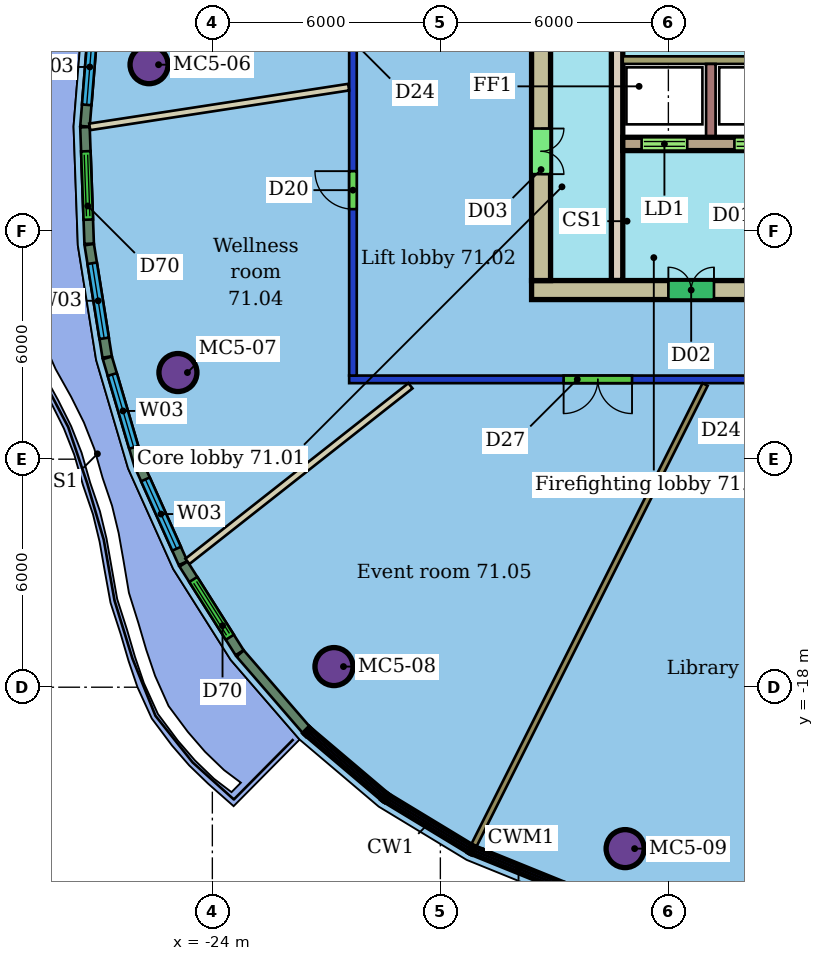
"""IFC4 building model, lengths in metres.
Left out: names, types, materials, properties, quantities, classifications, styles, units other than length and angle.
Written with IfcOpenShell. Run it as: python <this file> out.ifc"""

import sys

from ifc_helpers import new_model, si_unit, direction, frame, frame_2d, origin, origin_2d, place, context, subcontext, project, spatial, rectangle, hollow_circle, extrude, element, fill, save


model = new_model("IFC4")
c1 = context("Model", 3, precision=1e-05, world=origin(), true_north=direction((0.0, 1.0)))
c2 = subcontext(c1, "Body", "Model", "MODEL_VIEW")
j1 = project(units=[si_unit("LENGTHUNIT", "METRE"), si_unit("PLANEANGLEUNIT", "RADIAN")], contexts=[c1])
p1 = place(None, origin())
s1 = spatial("IfcSite", under=j1, at=p1, CompositionType="ELEMENT")
p2 = place(p1, origin())
s2 = spatial("IfcBuilding", under=s1, at=p2, CompositionType="ELEMENT")
p3 = place(p2, frame((0.0, 0.0, 286.5)))
s3 = spatial("IfcBuildingStorey", under=s2, at=p3, CompositionType="ELEMENT", Elevation=286.5)
for number, where, z_axis, x_axis in (
    (1, (-25.666, -1.62, 0.0), (0.0, 0.0, 1.0), (1.0, 0.0, 0.0)),
    (2, (-24.906, -9.72, 0.0), (0.0, 0.0, 1.0), (1.0, 0.0, 0.0)),
    (3, (-20.8, -17.457, 0.0), (0.0, 0.0, 1.0), (1.0, 0.0, 0.0)),
    (4, (-13.138, -22.247, 0.0), (0.0, 0.0, 1.0), (1.0, 0.0, 0.0)),
):
    element("IfcColumn", number, at=place(p3, frame(where, z_axis=z_axis, x_axis=x_axis)), inside=s3, PredefinedType="COLUMN", context=c2, shape_type="SweptSolid", body=[
        extrude(hollow_circle(Radius=0.5, WallThickness=0.04, at=origin_2d()), origin(), (0.0, 0.0, 1.0), 3.45),
    ])
p4 = place(p3, frame((8.4, -9.9, 0.0), z_axis=(0.0, 0.0, 1.0), x_axis=(-1.0, 0.0, 0.0)))
e5 = element("IfcWall", 5, at=p4, inside=s3, PredefinedType="PARTITIONING", context=c2, shape_type="SweptSolid", body=[
    extrude(rectangle(XDim=28.8, YDim=0.2, at=frame_2d((14.4, 0.0))), origin(), (0.0, 0.0, 1.0), 3.1),
])
p5 = place(p4, frame((21.356, 0.0, 0.0)))
e6 = element("IfcOpeningElement", 6, at=p5, cuts=e5, PredefinedType="OPENING", context=c2, shape_type="SweptSolid", body=[
    extrude(rectangle(XDim=1.8, YDim=2.4, at=frame_2d((0.9, 1.2))), frame((0.0, 0.11, 0.0), z_axis=(0.0, -1.0, 0.0), x_axis=(1.0, 0.0, 0.0)), (0.0, 0.0, 1.0), 0.22),
])
p6 = place(p4, frame((16.027, 0.0, 0.0)))
e7 = element("IfcOpeningElement", 7, at=p6, cuts=e5, PredefinedType="OPENING", context=c2, shape_type="SweptSolid", body=[
    extrude(rectangle(XDim=1.5, YDim=2.1, at=frame_2d((0.75, 1.05))), frame((0.0, 0.11, 0.0), z_axis=(0.0, -1.0, 0.0), x_axis=(1.0, 0.0, 0.0)), (0.0, 0.0, 1.0), 0.22),
])
p7 = place(p4, frame((8.479, 0.0, 0.0)))
e8 = element("IfcOpeningElement", 8, at=p7, cuts=e5, PredefinedType="OPENING", context=c2, shape_type="SweptSolid", body=[
    extrude(rectangle(XDim=0.9, YDim=2.1, at=frame_2d((0.45, 1.05))), frame((0.0, 0.11, 0.0), z_axis=(0.0, -1.0, 0.0), x_axis=(1.0, 0.0, 0.0)), (0.0, 0.0, 1.0), 0.22),
])
p8 = place(p3, frame((-20.3, -9.8, 0.0), z_axis=(0.0, 0.0, 1.0), x_axis=(0.0, 1.0, 0.0)))
e9 = element("IfcWall", 9, at=p8, inside=s3, PredefinedType="PARTITIONING", context=c2, shape_type="SweptSolid", body=[
    extrude(rectangle(XDim=19.6, YDim=0.2, at=frame_2d((9.8, 0.0))), origin(), (0.0, 0.0, 1.0), 3.1),
])
p9 = place(p8, frame((8.643, 0.0, 0.0)))
e10 = element("IfcOpeningElement", 10, at=p9, cuts=e9, PredefinedType="OPENING", context=c2, shape_type="SweptSolid", body=[
    extrude(rectangle(XDim=1.5, YDim=2.1, at=frame_2d((0.75, 1.05))), frame((0.0, 0.11, 0.0), z_axis=(0.0, -1.0, 0.0), x_axis=(1.0, 0.0, 0.0)), (0.0, 0.0, 1.0), 0.22),
])
p10 = place(p8, frame((4.379, 0.0, 0.0)))
e11 = element("IfcOpeningElement", 11, at=p10, cuts=e9, PredefinedType="OPENING", context=c2, shape_type="SweptSolid", body=[
    extrude(rectangle(XDim=1.0, YDim=2.1, at=frame_2d((0.5, 1.05))), frame((0.0, 0.11, 0.0), z_axis=(0.0, -1.0, 0.0), x_axis=(1.0, 0.0, 0.0)), (0.0, 0.0, 1.0), 0.22),
])
p11 = place(p3, frame((-27.228, -3.256, 0.0), z_axis=(0.0, 0.0, 1.0), x_axis=(0.988435478187, 0.151642030654, 0.0)))
e12 = element("IfcWall", 12, at=p11, inside=s3, PredefinedType="PARTITIONING", context=c2, shape_type="SweptSolid", body=[
    extrude(rectangle(XDim=6.894, YDim=0.175, at=frame_2d((3.447, 0.0))), origin(), (0.0, 0.0, 1.0), 3.45),
])
p12 = place(p3, frame((-24.656, -14.689, 0.0), z_axis=(0.0, 0.0, 1.0), x_axis=(0.785692916709, 0.618616715449, 0.0)))
e13 = element("IfcWall", 13, at=p12, inside=s3, PredefinedType="PARTITIONING", context=c2, shape_type="SweptSolid", body=[
    extrude(rectangle(XDim=7.469, YDim=0.175, at=frame_2d((3.734, 0.0))), origin(), (0.0, 0.0, 1.0), 3.45),
])
p13 = place(p3, frame((-17.118, -22.163, 0.0), z_axis=(0.0, 0.0, 1.0), x_axis=(0.448386215015, 0.893839919776, 0.0)))
e14 = element("IfcWall", 14, at=p13, inside=s3, PredefinedType="PARTITIONING", context=c2, shape_type="SweptSolid", body=[
    extrude(rectangle(XDim=13.57, YDim=0.15, at=frame_2d((6.785, 0.0))), origin(), (0.0, 0.0, 1.0), 3.45),
])
p14 = place(p3, frame((-27.098, -0.118, 0.0), z_axis=(0.0, 0.0, 1.0), x_axis=(-0.080847238515, -0.996726504125, 0.0)))
e15 = element("IfcWall", 15, at=p14, inside=s3, PredefinedType="SOLIDWALL", context=c2, shape_type="SweptSolid", body=[
    extrude(rectangle(XDim=3.135, YDim=0.25, at=frame_2d((1.567, 0.0))), origin(), (0.0, 0.0, 1.0), 3.15),
])
p15 = place(p14, frame((0.567, 0.0, 0.9)))
e16 = element("IfcOpeningElement", 16, at=p15, cuts=e15, PredefinedType="OPENING", context=c2, shape_type="SweptSolid", body=[
    extrude(rectangle(XDim=2.0, YDim=2.1, at=frame_2d((1.0, 1.05))), frame((0.0, 0.135, 0.0), z_axis=(0.0, -1.0, 0.0), x_axis=(1.0, 0.0, 0.0)), (0.0, 0.0, 1.0), 0.27),
])
p16 = place(p3, frame((-27.352, -3.265, 0.0), z_axis=(0.0, 0.0, 1.0), x_axis=(0.035961121069, -0.999353189704, 0.0)))
e17 = element("IfcWall", 17, at=p16, inside=s3, PredefinedType="SOLIDWALL", context=c2, shape_type="SweptSolid", body=[
    extrude(rectangle(XDim=3.069, YDim=0.25, at=frame_2d((1.534, 0.0))), origin(), (0.0, 0.0, 1.0), 3.15),
])
p17 = place(p16, frame((0.634, 0.0, 0.0)))
e18 = element("IfcOpeningElement", 18, at=p17, cuts=e17, PredefinedType="OPENING", context=c2, shape_type="SweptSolid", body=[
    extrude(rectangle(XDim=1.8, YDim=2.4, at=frame_2d((0.9, 1.2))), frame((0.0, 0.135, 0.0), z_axis=(0.0, -1.0, 0.0), x_axis=(1.0, 0.0, 0.0)), (0.0, 0.0, 1.0), 0.27),
])
p18 = place(p3, frame((-27.24, -6.354, 0.0), z_axis=(0.0, 0.0, 1.0), x_axis=(0.157503758702, -0.987518387674, 0.0)))
e19 = element("IfcWall", 19, at=p18, inside=s3, PredefinedType="SOLIDWALL", context=c2, shape_type="SweptSolid", body=[
    extrude(rectangle(XDim=2.993, YDim=0.25, at=frame_2d((1.497, 0.0))), origin(), (0.0, 0.0, 1.0), 3.15),
])
p19 = place(p18, frame((0.497, 0.0, 0.9)))
e20 = element("IfcOpeningElement", 20, at=p19, cuts=e19, PredefinedType="OPENING", context=c2, shape_type="SweptSolid", body=[
    extrude(rectangle(XDim=2.0, YDim=2.1, at=frame_2d((1.0, 1.05))), frame((0.0, 0.135, 0.0), z_axis=(0.0, -1.0, 0.0), x_axis=(1.0, 0.0, 0.0)), (0.0, 0.0, 1.0), 0.27),
])
p20 = place(p3, frame((-26.763, -9.333, 0.0), z_axis=(0.0, 0.0, 1.0), x_axis=(0.282592797693, -0.959239965124, 0.0)))
e21 = element("IfcWall", 21, at=p20, inside=s3, PredefinedType="SOLIDWALL", context=c2, shape_type="SweptSolid", body=[
    extrude(rectangle(XDim=2.913, YDim=0.25, at=frame_2d((1.457, 0.0))), origin(), (0.0, 0.0, 1.0), 3.15),
])
p21 = place(p20, frame((0.457, 0.0, 0.9)))
e22 = element("IfcOpeningElement", 22, at=p21, cuts=e21, PredefinedType="OPENING", context=c2, shape_type="SweptSolid", body=[
    extrude(rectangle(XDim=2.0, YDim=2.1, at=frame_2d((1.0, 1.05))), frame((0.0, 0.135, 0.0), z_axis=(0.0, -1.0, 0.0), x_axis=(1.0, 0.0, 0.0)), (0.0, 0.0, 1.0), 0.27),
])
p22 = place(p3, frame((-25.931, -12.151, 0.0), z_axis=(0.0, 0.0, 1.0), x_axis=(0.409357706151, -0.91237397399, 0.0)))
e23 = element("IfcWall", 23, at=p22, inside=s3, PredefinedType="SOLIDWALL", context=c2, shape_type="SweptSolid", body=[
    extrude(rectangle(XDim=2.833, YDim=0.25, at=frame_2d((1.417, 0.0))), origin(), (0.0, 0.0, 1.0), 3.15),
])
p23 = place(p22, frame((0.417, 0.0, 0.9)))
e24 = element("IfcOpeningElement", 24, at=p23, cuts=e23, PredefinedType="OPENING", context=c2, shape_type="SweptSolid", body=[
    extrude(rectangle(XDim=2.0, YDim=2.1, at=frame_2d((1.0, 1.05))), frame((0.0, 0.135, 0.0), z_axis=(0.0, -1.0, 0.0), x_axis=(1.0, 0.0, 0.0)), (0.0, 0.0, 1.0), 0.27),
])
p24 = place(p3, frame((-24.759, -14.759, 0.0), z_axis=(0.0, 0.0, 1.0), x_axis=(0.534618506931, -0.845093516747, 0.0)))
e25 = element("IfcWall", 25, at=p24, inside=s3, PredefinedType="SOLIDWALL", context=c2, shape_type="SweptSolid", body=[
    extrude(rectangle(XDim=2.76, YDim=0.25, at=frame_2d((1.38, 0.0))), origin(), (0.0, 0.0, 1.0), 3.15),
])
p25 = place(p24, frame((0.48, 0.0, 0.0)))
e26 = element("IfcOpeningElement", 26, at=p25, cuts=e25, PredefinedType="OPENING", context=c2, shape_type="SweptSolid", body=[
    extrude(rectangle(XDim=1.8, YDim=2.4, at=frame_2d((0.9, 1.2))), frame((0.0, 0.135, 0.0), z_axis=(0.0, -1.0, 0.0), x_axis=(1.0, 0.0, 0.0)), (0.0, 0.0, 1.0), 0.27),
])
p26 = place(p3, frame((-23.267, -17.113, 0.0), z_axis=(0.0, 0.0, 1.0), x_axis=(0.654220123959, -0.756304191055, 0.0)))
e27 = element("IfcWall", 27, at=p26, inside=s3, PredefinedType="SOLIDWALL", context=c2, shape_type="SweptSolid", body=[
    extrude(rectangle(XDim=2.657, YDim=0.25, at=frame_2d((1.329, 0.0))), origin(), (0.0, 0.0, 1.0), 3.15),
])
p27 = place(p3, frame((-15.6, -7.55, 0.0), z_axis=(0.0, 0.0, 1.0), x_axis=(1.0, 0.0, 0.0)))
e28 = element("IfcWall", 28, at=p27, inside=s3, PredefinedType="SHEAR", context=c2, shape_type="SweptSolid", body=[
    extrude(rectangle(XDim=19.2, YDim=0.5, at=frame_2d((9.6, 0.0))), origin(), (0.0, 0.0, 1.0), 3.3),
])
p28 = place(p27, frame((3.6, 0.0, 0.0)))
e29 = element("IfcOpeningElement", 29, at=p28, cuts=e28, PredefinedType="OPENING", context=c2, shape_type="SweptSolid", body=[
    extrude(rectangle(XDim=1.2, YDim=2.1, at=frame_2d((0.6, 1.05))), frame((0.0, 0.26, 0.0), z_axis=(0.0, -1.0, 0.0), x_axis=(1.0, 0.0, 0.0)), (0.0, 0.0, 1.0), 0.52),
])
p29 = place(p3, frame((-15.35, 7.3, 0.0), z_axis=(0.0, 0.0, 1.0), x_axis=(0.0, -1.0, 0.0)))
e30 = element("IfcWall", 30, at=p29, inside=s3, PredefinedType="SHEAR", context=c2, shape_type="SweptSolid", body=[
    extrude(rectangle(XDim=14.6, YDim=0.5, at=frame_2d((7.3, 0.0))), origin(), (0.0, 0.0, 1.0), 3.3),
])
p30 = place(p29, frame((10.6, 0.0, 0.0)))
e31 = element("IfcOpeningElement", 31, at=p30, cuts=e30, PredefinedType="OPENING", context=c2, shape_type="SweptSolid", body=[
    extrude(rectangle(XDim=1.2, YDim=2.1, at=frame_2d((0.6, 1.05))), frame((0.0, 0.26, 0.0), z_axis=(0.0, -1.0, 0.0), x_axis=(1.0, 0.0, 0.0)), (0.0, 0.0, 1.0), 0.52),
])
p31 = place(p29, frame((2.8, 0.0, 0.0)))
e32 = element("IfcOpeningElement", 32, at=p31, cuts=e30, PredefinedType="OPENING", context=c2, shape_type="SweptSolid", body=[
    extrude(rectangle(XDim=1.2, YDim=2.1, at=frame_2d((0.6, 1.05))), frame((0.0, 0.26, 0.0), z_axis=(0.0, -1.0, 0.0), x_axis=(1.0, 0.0, 0.0)), (0.0, 0.0, 1.0), 0.52),
])
p32 = place(p3, frame((-13.2, -3.705, 0.0), z_axis=(0.0, 0.0, 1.0), x_axis=(1.0, 0.0, 0.0)))
e33 = element("IfcWall", 33, at=p32, inside=s3, PredefinedType="SHEAR", context=c2, shape_type="SweptSolid", body=[
    extrude(rectangle(XDim=7.2, YDim=0.35, at=frame_2d((3.6, 0.0))), origin(), (0.0, 0.0, 1.0), 3.3),
])
p33 = place(p32, frame((0.496, 0.0, 0.0)))
e34 = element("IfcOpeningElement", 34, at=p33, cuts=e33, PredefinedType="OPENING", context=c2, shape_type="SweptSolid", body=[
    extrude(rectangle(XDim=1.2, YDim=2.1, at=frame_2d((0.6, 1.05))), frame((0.0, 0.185, 0.0), z_axis=(0.0, -1.0, 0.0), x_axis=(1.0, 0.0, 0.0)), (0.0, 0.0, 1.0), 0.37),
])
p34 = place(p32, frame((2.938, 0.0, 0.0)))
e35 = element("IfcOpeningElement", 35, at=p34, cuts=e33, PredefinedType="OPENING", context=c2, shape_type="SweptSolid", body=[
    extrude(rectangle(XDim=1.2, YDim=2.1, at=frame_2d((0.6, 1.05))), frame((0.0, 0.185, 0.0), z_axis=(0.0, -1.0, 0.0), x_axis=(1.0, 0.0, 0.0)), (0.0, 0.0, 1.0), 0.37),
])
p35 = place(p3, frame((-13.35, 7.3, 0.0), z_axis=(0.0, 0.0, 1.0), x_axis=(0.0, -1.0, 0.0)))
e36 = element("IfcWall", 36, at=p35, inside=s3, PredefinedType="SHEAR", context=c2, shape_type="SweptSolid", body=[
    extrude(rectangle(XDim=14.6, YDim=0.3, at=frame_2d((7.3, 0.0))), origin(), (0.0, 0.0, 1.0), 3.3),
])
p36 = place(p35, frame((6.55, 0.0, 0.0)))
e37 = element("IfcOpeningElement", 37, at=p36, cuts=e36, PredefinedType="OPENING", context=c2, shape_type="SweptSolid", body=[
    extrude(rectangle(XDim=1.5, YDim=2.1, at=frame_2d((0.75, 1.05))), frame((0.0, 0.16, 0.0), z_axis=(0.0, -1.0, 0.0), x_axis=(1.0, 0.0, 0.0)), (0.0, 0.0, 1.0), 0.32),
])
p37 = place(p3, frame((1.2, -1.5, 0.0), z_axis=(0.0, 0.0, 1.0), x_axis=(-1.0, 0.0, 0.0)))
e38 = element("IfcWall", 38, at=p37, inside=s3, PredefinedType="SHEAR", context=c2, shape_type="SweptSolid", body=[
    extrude(rectangle(XDim=14.4, YDim=0.2, at=frame_2d((7.2, 0.0))), origin(), (0.0, 0.0, 1.0), 3.3),
])
p38 = place(p37, frame((7.821, 0.0, 0.0)))
e39 = element("IfcOpeningElement", 39, at=p38, cuts=e38, PredefinedType="OPENING", context=c2, shape_type="SweptSolid", body=[
    extrude(rectangle(XDim=1.2, YDim=2.1, at=frame_2d((0.6, 1.05))), frame((0.0, 0.11, 0.0), z_axis=(0.0, -1.0, 0.0), x_axis=(1.0, 0.0, 0.0)), (0.0, 0.0, 1.0), 0.22),
])
p39 = place(p37, frame((0.546, 0.0, 0.0)))
e40 = element("IfcOpeningElement", 40, at=p39, cuts=e38, PredefinedType="OPENING", context=c2, shape_type="SweptSolid", body=[
    extrude(rectangle(XDim=1.1, YDim=2.1, at=frame_2d((0.55, 1.05))), frame((0.0, 0.11, 0.0), z_axis=(0.0, -1.0, 0.0), x_axis=(1.0, 0.0, 0.0)), (0.0, 0.0, 1.0), 0.22),
])
p40 = place(p37, frame((2.592, 0.0, 0.0)))
e41 = element("IfcOpeningElement", 41, at=p40, cuts=e38, PredefinedType="OPENING", context=c2, shape_type="SweptSolid", body=[
    extrude(rectangle(XDim=0.9, YDim=2.1, at=frame_2d((0.45, 1.05))), frame((0.0, 0.11, 0.0), z_axis=(0.0, -1.0, 0.0), x_axis=(1.0, 0.0, 0.0)), (0.0, 0.0, 1.0), 0.22),
])
p41 = place(p3, frame((-10.883, -1.6, 0.0), z_axis=(0.0, 0.0, 1.0), x_axis=(0.0, -1.0, 0.0)))
e42 = element("IfcWall", 42, at=p41, inside=s3, PredefinedType="SHEAR", context=c2, shape_type="SweptSolid", body=[
    extrude(rectangle(XDim=1.93, YDim=0.25, at=frame_2d((0.965, 0.0))), origin(), (0.0, 0.0, 1.0), 3.3),
])
p42 = place(p10, origin())
e43 = element("IfcDoor", 43, at=p42, inside=s3, OperationType="SINGLE_SWING_RIGHT", PredefinedType="DOOR", context=c2, shape_type="SweptSolid", body=[
    extrude(rectangle(XDim=1.0, YDim=2.1, at=frame_2d((0.5, 1.05))), frame((0.0, 0.025, 0.0), z_axis=(0.0, -1.0, 0.0), x_axis=(1.0, 0.0, 0.0)), (0.0, 0.0, 1.0), 0.05),
])
fill(e11, e43)
p43 = place(p5, origin())
e44 = element("IfcDoor", 44, at=p43, inside=s3, OperationType="DOUBLE_DOOR_SINGLE_SWING", PredefinedType="DOOR", context=c2, shape_type="SweptSolid", body=[
    extrude(rectangle(XDim=1.8, YDim=2.4, at=frame_2d((0.9, 1.2))), frame((0.0, 0.025, 0.0), z_axis=(0.0, -1.0, 0.0), x_axis=(1.0, 0.0, 0.0)), (0.0, 0.0, 1.0), 0.05),
])
fill(e6, e44)
p44 = place(p15, origin())
e45 = element("IfcWindow", 45, at=p44, inside=s3, PartitioningType="SINGLE_PANEL", PredefinedType="WINDOW", context=c2, shape_type="SweptSolid", body=[
    extrude(rectangle(XDim=2.0, YDim=2.1, at=frame_2d((1.0, 1.05))), frame((0.0, 0.03, 0.0), z_axis=(0.0, -1.0, 0.0), x_axis=(1.0, 0.0, 0.0)), (0.0, 0.0, 1.0), 0.06),
])
fill(e16, e45)
p45 = place(p17, origin())
e46 = element("IfcDoor", 46, at=p45, inside=s3, OperationType="DOUBLE_DOOR_SLIDING", PredefinedType="DOOR", context=c2, shape_type="SweptSolid", body=[
    extrude(rectangle(XDim=1.8, YDim=2.4, at=frame_2d((0.9, 1.2))), frame((0.0, 0.025, 0.0), z_axis=(0.0, -1.0, 0.0), x_axis=(1.0, 0.0, 0.0)), (0.0, 0.0, 1.0), 0.05),
])
fill(e18, e46)
p46 = place(p19, origin())
e47 = element("IfcWindow", 47, at=p46, inside=s3, PartitioningType="SINGLE_PANEL", PredefinedType="WINDOW", context=c2, shape_type="SweptSolid", body=[
    extrude(rectangle(XDim=2.0, YDim=2.1, at=frame_2d((1.0, 1.05))), frame((0.0, 0.03, 0.0), z_axis=(0.0, -1.0, 0.0), x_axis=(1.0, 0.0, 0.0)), (0.0, 0.0, 1.0), 0.06),
])
fill(e20, e47)
p47 = place(p21, origin())
e48 = element("IfcWindow", 48, at=p47, inside=s3, PartitioningType="SINGLE_PANEL", PredefinedType="WINDOW", context=c2, shape_type="SweptSolid", body=[
    extrude(rectangle(XDim=2.0, YDim=2.1, at=frame_2d((1.0, 1.05))), frame((0.0, 0.03, 0.0), z_axis=(0.0, -1.0, 0.0), x_axis=(1.0, 0.0, 0.0)), (0.0, 0.0, 1.0), 0.06),
])
fill(e22, e48)
p48 = place(p23, origin())
e49 = element("IfcWindow", 49, at=p48, inside=s3, PartitioningType="SINGLE_PANEL", PredefinedType="WINDOW", context=c2, shape_type="SweptSolid", body=[
    extrude(rectangle(XDim=2.0, YDim=2.1, at=frame_2d((1.0, 1.05))), frame((0.0, 0.03, 0.0), z_axis=(0.0, -1.0, 0.0), x_axis=(1.0, 0.0, 0.0)), (0.0, 0.0, 1.0), 0.06),
])
fill(e24, e49)
p49 = place(p25, origin())
e50 = element("IfcDoor", 50, at=p49, inside=s3, OperationType="DOUBLE_DOOR_SLIDING", PredefinedType="DOOR", context=c2, shape_type="SweptSolid", body=[
    extrude(rectangle(XDim=1.8, YDim=2.4, at=frame_2d((0.9, 1.2))), frame((0.0, 0.025, 0.0), z_axis=(0.0, -1.0, 0.0), x_axis=(1.0, 0.0, 0.0)), (0.0, 0.0, 1.0), 0.05),
])
fill(e26, e50)
p50 = place(p28, origin())
e51 = element("IfcDoor", 51, at=p50, inside=s3, OperationType="DOUBLE_DOOR_SINGLE_SWING", PredefinedType="NOTDEFINED", context=c2, shape_type="SweptSolid", body=[
    extrude(rectangle(XDim=1.2, YDim=2.1, at=frame_2d((0.6, 1.05))), frame((0.0, 0.025, 0.0), z_axis=(0.0, -1.0, 0.0), x_axis=(1.0, 0.0, 0.0)), (0.0, 0.0, 1.0), 0.05),
])
fill(e29, e51)
p51 = place(p30, origin())
e52 = element("IfcDoor", 52, at=p51, inside=s3, OperationType="DOUBLE_DOOR_SINGLE_SWING", PredefinedType="NOTDEFINED", context=c2, shape_type="SweptSolid", body=[
    extrude(rectangle(XDim=1.2, YDim=2.1, at=frame_2d((0.6, 1.05))), frame((0.0, 0.025, 0.0), z_axis=(0.0, -1.0, 0.0), x_axis=(1.0, 0.0, 0.0)), (0.0, 0.0, 1.0), 0.05),
])
fill(e31, e52)
p52 = place(p33, origin())
e53 = element("IfcDoor", 53, at=p52, inside=s3, OperationType="DOUBLE_DOOR_SLIDING", PredefinedType="NOTDEFINED", context=c2, shape_type="SweptSolid", body=[
    extrude(rectangle(XDim=1.2, YDim=2.1, at=frame_2d((0.6, 1.05))), frame((0.0, 0.025, 0.0), z_axis=(0.0, -1.0, 0.0), x_axis=(1.0, 0.0, 0.0)), (0.0, 0.0, 1.0), 0.05),
])
fill(e34, e53)
p53 = place(p34, origin())
e54 = element("IfcDoor", 54, at=p53, inside=s3, OperationType="DOUBLE_DOOR_SLIDING", PredefinedType="NOTDEFINED", context=c2, shape_type="SweptSolid", body=[
    extrude(rectangle(XDim=1.2, YDim=2.1, at=frame_2d((0.6, 1.05))), frame((0.0, 0.025, 0.0), z_axis=(0.0, -1.0, 0.0), x_axis=(1.0, 0.0, 0.0)), (0.0, 0.0, 1.0), 0.05),
])
fill(e35, e54)
save(model, sys.argv[1])
